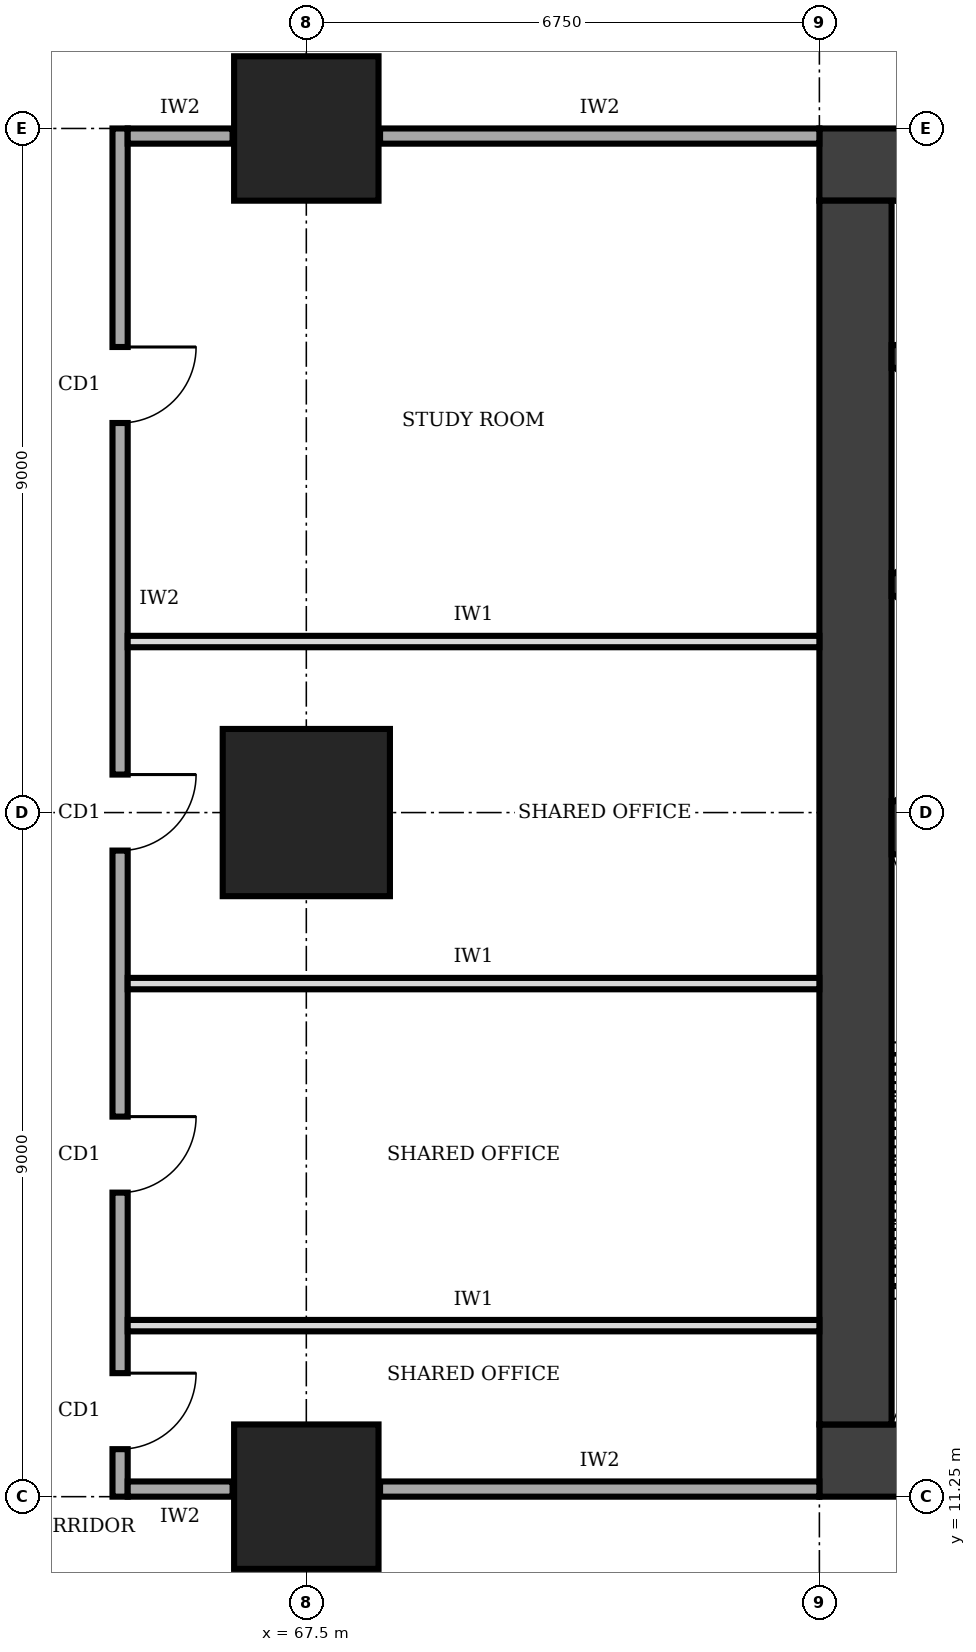
"""IFC4 building model, lengths in metres.
Left out: names, types, materials, properties, quantities, classifications, styles, units other than length and angle.
Written with IfcOpenShell. Run it as: python <this file> out.ifc"""

import sys

from ifc_helpers import new_model, si_unit, direction, frame, frame_2d, origin, origin_2d, place, context, subcontext, project, spatial, rectangle, extrude, element, fill, save


model = new_model("IFC4")
c1 = context("Model", 3, precision=1e-05, world=origin(), true_north=direction((0.0, 1.0)))
c2 = subcontext(c1, "Body", "Model", "MODEL_VIEW")
j1 = project(units=[si_unit("LENGTHUNIT", "METRE"), si_unit("PLANEANGLEUNIT", "RADIAN")], contexts=[c1])
p1 = place(None, origin())
s1 = spatial("IfcSite", under=j1, at=p1, CompositionType="ELEMENT")
p2 = place(p1, origin())
s2 = spatial("IfcBuilding", under=s1, at=p2, CompositionType="ELEMENT")
p3 = place(p2, frame((0.0, 0.0, 157.0)))
s3 = spatial("IfcBuildingStorey", under=s2, at=p3, CompositionType="ELEMENT", Elevation=157.0)
p4 = place(p3, frame((74.25, 11.725, 0.0), z_axis=(0.0, 0.0, 1.0), x_axis=(1.0, 0.0, 0.0)))
e1 = element("IfcWall", 1, at=p4, inside=s3, PredefinedType="SHEAR", context=c2, shape_type="SweptSolid", body=[
    extrude(rectangle(XDim=13.5, YDim=0.95, at=frame_2d((6.75, 0.0))), origin(), (0.0, 0.0, 1.0), 4.0),
])
p5 = place(p4, frame((4.75, 0.0, 0.0)))
e2 = element("IfcOpeningElement", 2, at=p5, cuts=e1, PredefinedType="OPENING", context=c2, shape_type="SweptSolid", body=[
    extrude(rectangle(XDim=1.0, YDim=2.1, at=frame_2d((0.5, 1.05))), frame((0.0, 0.485, 0.0), z_axis=(0.0, -1.0, 0.0), x_axis=(1.0, 0.0, 0.0)), (0.0, 0.0, 1.0), 0.97),
])
p6 = place(p3, frame((87.75, 28.775, 0.0), z_axis=(0.0, 0.0, 1.0), x_axis=(-1.0, 0.0, 0.0)))
e3 = element("IfcWall", 3, at=p6, inside=s3, PredefinedType="SHEAR", context=c2, shape_type="SweptSolid", body=[
    extrude(rectangle(XDim=13.5, YDim=0.95, at=frame_2d((6.75, 0.0))), origin(), (0.0, 0.0, 1.0), 4.0),
])
p7 = place(p6, frame((4.75, 0.0, 0.0)))
e4 = element("IfcOpeningElement", 4, at=p7, cuts=e3, PredefinedType="OPENING", context=c2, shape_type="SweptSolid", body=[
    extrude(rectangle(XDim=1.8, YDim=2.1, at=frame_2d((0.9, 1.05))), frame((0.0, 0.485, 0.0), z_axis=(0.0, -1.0, 0.0), x_axis=(1.0, 0.0, 0.0)), (0.0, 0.0, 1.0), 0.97),
])
p8 = place(p3, frame((74.725, 28.3, 0.0), z_axis=(0.0, 0.0, 1.0), x_axis=(0.0, -1.0, 0.0)))
e5 = element("IfcWall", 5, at=p8, inside=s3, PredefinedType="SHEAR", context=c2, shape_type="SweptSolid", body=[
    extrude(rectangle(XDim=16.1, YDim=0.95, at=frame_2d((8.05, 0.0))), origin(), (0.0, 0.0, 1.0), 4.0),
])
p9 = place(p3, frame((75.2, 20.05, 0.0), z_axis=(0.0, 0.0, 1.0), x_axis=(1.0, 0.0, 0.0)))
e6 = element("IfcWall", 6, at=p9, inside=s3, PredefinedType="SHEAR", context=c2, shape_type="SweptSolid", body=[
    extrude(rectangle(XDim=3.4, YDim=0.7, at=frame_2d((1.7, 0.0))), origin(), (0.0, 0.0, 1.0), 4.0),
])
for number, where, z_axis, x_axis in (
    (7, (75.2, 23.25, 0.0), (0.0, 0.0, 1.0), (1.0, 0.0, 0.0)),
    (8, (75.2, 26.25, 0.0), (0.0, 0.0, 1.0), (1.0, 0.0, 0.0)),
):
    element("IfcWall", number, at=place(p3, frame(where, z_axis=z_axis, x_axis=x_axis)), inside=s3, PredefinedType="SHEAR", context=c2, shape_type="SweptSolid", body=[
        extrude(rectangle(XDim=3.4, YDim=0.3, at=frame_2d((1.7, 0.0))), origin(), (0.0, 0.0, 1.0), 4.0),
    ])
p10 = place(p3, frame((67.5, 11.25, 0.0), z_axis=(0.0, 0.0, 1.0), x_axis=(1.0, 0.0, 0.0)))
e9 = element("IfcColumn", 9, at=p10, inside=s3, PredefinedType="COLUMN", context=c2, shape_type="SweptSolid", body=[
    extrude(rectangle(XDim=1.9, YDim=1.9, at=origin_2d()), origin(), (0.0, 0.0, 1.0), 4.0),
])
p11 = place(p3, frame((67.5, 20.25, 0.0), z_axis=(0.0, 0.0, 1.0), x_axis=(1.0, 0.0, 0.0)))
e10 = element("IfcColumn", 10, at=p11, inside=s3, PredefinedType="COLUMN", context=c2, shape_type="SweptSolid", body=[
    extrude(rectangle(XDim=2.2, YDim=2.2, at=origin_2d()), origin(), (0.0, 0.0, 1.0), 4.0),
])
p12 = place(p3, frame((67.5, 29.25, 0.0), z_axis=(0.0, 0.0, 1.0), x_axis=(1.0, 0.0, 0.0)))
e11 = element("IfcColumn", 11, at=p12, inside=s3, PredefinedType="COLUMN", context=c2, shape_type="SweptSolid", body=[
    extrude(rectangle(XDim=1.9, YDim=1.9, at=origin_2d()), origin(), (0.0, 0.0, 1.0), 4.0),
])
p13 = place(p3, frame((65.05, 29.25, 0.0), z_axis=(0.0, 0.0, 1.0), x_axis=(0.0, -1.0, 0.0)))
e12 = element("IfcWall", 12, at=p13, inside=s3, PredefinedType="SOLIDWALL", context=c2, shape_type="SweptSolid", body=[
    extrude(rectangle(XDim=18.0, YDim=0.2, at=frame_2d((9.0, 0.0))), origin(), (0.0, 0.0, 1.0), 3.75),
])
p14 = place(p13, frame((16.375, 0.0, 0.0)))
e13 = element("IfcOpeningElement", 13, at=p14, cuts=e12, PredefinedType="OPENING", context=c2, shape_type="SweptSolid", body=[
    extrude(rectangle(XDim=1.0, YDim=2.1, at=frame_2d((0.5, 1.05))), frame((0.0, 0.11, 0.0), z_axis=(0.0, -1.0, 0.0), x_axis=(1.0, 0.0, 0.0)), (0.0, 0.0, 1.0), 0.22),
])
p15 = place(p13, frame((13.0, 0.0, 0.0)))
e14 = element("IfcOpeningElement", 14, at=p15, cuts=e12, PredefinedType="OPENING", context=c2, shape_type="SweptSolid", body=[
    extrude(rectangle(XDim=1.0, YDim=2.1, at=frame_2d((0.5, 1.05))), frame((0.0, 0.11, 0.0), z_axis=(0.0, -1.0, 0.0), x_axis=(1.0, 0.0, 0.0)), (0.0, 0.0, 1.0), 0.22),
])
p16 = place(p13, frame((8.5, 0.0, 0.0)))
e15 = element("IfcOpeningElement", 15, at=p16, cuts=e12, PredefinedType="OPENING", context=c2, shape_type="SweptSolid", body=[
    extrude(rectangle(XDim=1.0, YDim=2.1, at=frame_2d((0.5, 1.05))), frame((0.0, 0.11, 0.0), z_axis=(0.0, -1.0, 0.0), x_axis=(1.0, 0.0, 0.0)), (0.0, 0.0, 1.0), 0.22),
])
p17 = place(p13, frame((2.875, 0.0, 0.0)))
e16 = element("IfcOpeningElement", 16, at=p17, cuts=e12, PredefinedType="OPENING", context=c2, shape_type="SweptSolid", body=[
    extrude(rectangle(XDim=1.0, YDim=2.1, at=frame_2d((0.5, 1.05))), frame((0.0, 0.11, 0.0), z_axis=(0.0, -1.0, 0.0), x_axis=(1.0, 0.0, 0.0)), (0.0, 0.0, 1.0), 0.22),
])
p18 = place(p3, frame((65.15, 11.35, 0.0), z_axis=(0.0, 0.0, 1.0), x_axis=(1.0, 0.0, 0.0)))
e17 = element("IfcWall", 17, at=p18, inside=s3, PredefinedType="SOLIDWALL", context=c2, shape_type="SweptSolid", body=[
    extrude(rectangle(XDim=1.38, YDim=0.2, at=frame_2d((0.69, 0.0))), origin(), (0.0, 0.0, 1.0), 2.85),
])
p19 = place(p3, frame((68.47, 11.35, 0.0), z_axis=(0.0, 0.0, 1.0), x_axis=(1.0, 0.0, 0.0)))
e18 = element("IfcWall", 18, at=p19, inside=s3, PredefinedType="SOLIDWALL", context=c2, shape_type="SweptSolid", body=[
    extrude(rectangle(XDim=5.78, YDim=0.2, at=frame_2d((2.89, 0.0))), origin(), (0.0, 0.0, 1.0), 2.85),
])
p20 = place(p3, frame((65.15, 29.15, 0.0), z_axis=(0.0, 0.0, 1.0), x_axis=(1.0, 0.0, 0.0)))
e19 = element("IfcWall", 19, at=p20, inside=s3, PredefinedType="SOLIDWALL", context=c2, shape_type="SweptSolid", body=[
    extrude(rectangle(XDim=1.38, YDim=0.2, at=frame_2d((0.69, 0.0))), origin(), (0.0, 0.0, 1.0), 2.85),
])
p21 = place(p3, frame((68.47, 29.15, 0.0), z_axis=(0.0, 0.0, 1.0), x_axis=(1.0, 0.0, 0.0)))
e20 = element("IfcWall", 20, at=p21, inside=s3, PredefinedType="SOLIDWALL", context=c2, shape_type="SweptSolid", body=[
    extrude(rectangle(XDim=5.78, YDim=0.2, at=frame_2d((2.89, 0.0))), origin(), (0.0, 0.0, 1.0), 2.85),
])
for number, where, z_axis, x_axis in (
    (21, (65.15, 13.5, 0.0), (0.0, 0.0, 1.0), (1.0, 0.0, 0.0)),
    (22, (65.15, 18.0, 0.0), (0.0, 0.0, 1.0), (1.0, 0.0, 0.0)),
    (23, (65.15, 22.5, 0.0), (0.0, 0.0, 1.0), (1.0, 0.0, 0.0)),
):
    element("IfcWall", number, at=place(p3, frame(where, z_axis=z_axis, x_axis=x_axis)), inside=s3, PredefinedType="PARTITIONING", context=c2, shape_type="SweptSolid", body=[
        extrude(rectangle(XDim=9.1, YDim=0.15, at=frame_2d((4.55, 0.0))), origin(), (0.0, 0.0, 1.0), 3.75),
    ])
p22 = place(p14, origin())
e24 = element("IfcDoor", 24, at=p22, inside=s3, OperationType="SINGLE_SWING_LEFT", PredefinedType="DOOR", context=c2, shape_type="SweptSolid", body=[
    extrude(rectangle(XDim=1.0, YDim=2.1, at=frame_2d((0.5, 1.05))), frame((0.0, 0.025, 0.0), z_axis=(0.0, -1.0, 0.0), x_axis=(1.0, 0.0, 0.0)), (0.0, 0.0, 1.0), 0.05),
])
fill(e13, e24)
p23 = place(p15, origin())
e25 = element("IfcDoor", 25, at=p23, inside=s3, OperationType="SINGLE_SWING_LEFT", PredefinedType="DOOR", context=c2, shape_type="SweptSolid", body=[
    extrude(rectangle(XDim=1.0, YDim=2.1, at=frame_2d((0.5, 1.05))), frame((0.0, 0.025, 0.0), z_axis=(0.0, -1.0, 0.0), x_axis=(1.0, 0.0, 0.0)), (0.0, 0.0, 1.0), 0.05),
])
fill(e14, e25)
p24 = place(p16, origin())
e26 = element("IfcDoor", 26, at=p24, inside=s3, OperationType="SINGLE_SWING_LEFT", PredefinedType="DOOR", context=c2, shape_type="SweptSolid", body=[
    extrude(rectangle(XDim=1.0, YDim=2.1, at=frame_2d((0.5, 1.05))), frame((0.0, 0.025, 0.0), z_axis=(0.0, -1.0, 0.0), x_axis=(1.0, 0.0, 0.0)), (0.0, 0.0, 1.0), 0.05),
])
fill(e15, e26)
p25 = place(p17, origin())
e27 = element("IfcDoor", 27, at=p25, inside=s3, OperationType="SINGLE_SWING_LEFT", PredefinedType="DOOR", context=c2, shape_type="SweptSolid", body=[
    extrude(rectangle(XDim=1.0, YDim=2.1, at=frame_2d((0.5, 1.05))), frame((0.0, 0.025, 0.0), z_axis=(0.0, -1.0, 0.0), x_axis=(1.0, 0.0, 0.0)), (0.0, 0.0, 1.0), 0.05),
])
fill(e16, e27)
save(model, sys.argv[1])
